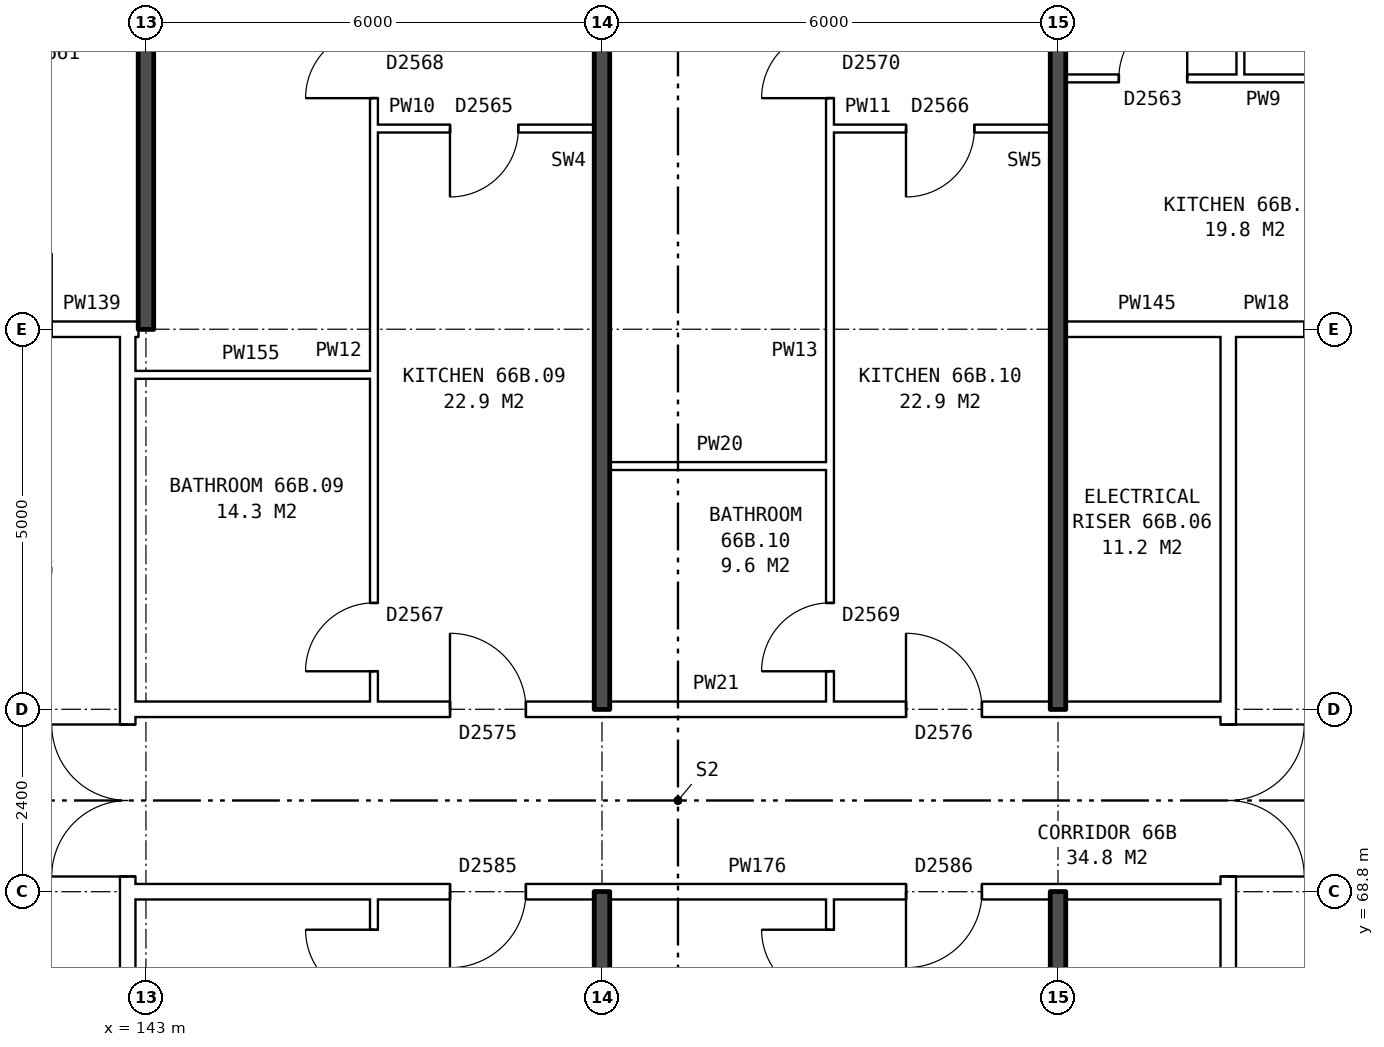
"""IFC4 building model, lengths in metres.
Left out: names, types, materials, properties, quantities, classifications, styles, units other than length and angle.
Written with IfcOpenShell. Run it as: python <this file> out.ifc"""

import sys

from ifc_helpers import new_model, si_unit, direction, frame, frame_2d, origin, place, context, subcontext, project, spatial, rectangle, extrude, element, fill, save


model = new_model("IFC4")
c1 = context("Model", 3, precision=1e-05, world=origin(), true_north=direction((0.0, 1.0)))
c2 = subcontext(c1, "Body", "Model", "MODEL_VIEW")
j1 = project(units=[si_unit("LENGTHUNIT", "METRE"), si_unit("PLANEANGLEUNIT", "RADIAN")], contexts=[c1])
p1 = place(None, origin())
s1 = spatial("IfcSite", under=j1, at=p1, CompositionType="ELEMENT")
p2 = place(p1, origin())
s2 = spatial("IfcBuilding", under=s1, at=p2, CompositionType="ELEMENT")
p3 = place(p2, frame((0.0, 0.0, 233.8)))
s3 = spatial("IfcBuildingStorey", under=s2, at=p3, CompositionType="ELEMENT", Elevation=233.8)
p4 = place(p3, frame((142.76, 63.9, 0.0), z_axis=(0.0, 0.0, 1.0), x_axis=(0.0, 1.0, 0.0)))
e1 = element("IfcWall", 1, at=p4, inside=s3, PredefinedType="PARTITIONING", context=c2, shape_type="SweptSolid", body=[
    extrude(rectangle(XDim=12.2, YDim=0.2, at=frame_2d((6.1, 0.0))), origin(), (0.0, 0.0, 1.0), 2.85),
])
p5 = place(p4, frame((5.1, 0.0, 0.0)))
e2 = element("IfcOpeningElement", 2, at=p5, cuts=e1, PredefinedType="OPENING", context=c2, shape_type="SweptSolid", body=[
    extrude(rectangle(XDim=2.0, YDim=2.1, at=frame_2d((1.0, 1.05))), frame((0.0, 0.11, 0.0), z_axis=(0.0, -1.0, 0.0), x_axis=(1.0, 0.0, 0.0)), (0.0, 0.0, 1.0), 0.22),
])
p6 = place(p3, frame((157.24, 63.9, 0.0), z_axis=(0.0, 0.0, 1.0), x_axis=(0.0, 1.0, 0.0)))
e3 = element("IfcWall", 3, at=p6, inside=s3, PredefinedType="PARTITIONING", context=c2, shape_type="SweptSolid", body=[
    extrude(rectangle(XDim=12.2, YDim=0.2, at=frame_2d((6.1, 0.0))), origin(), (0.0, 0.0, 1.0), 2.85),
])
p7 = place(p6, frame((5.1, 0.0, 0.0)))
e4 = element("IfcOpeningElement", 4, at=p7, cuts=e3, PredefinedType="OPENING", context=c2, shape_type="SweptSolid", body=[
    extrude(rectangle(XDim=2.0, YDim=2.1, at=frame_2d((1.0, 1.05))), frame((0.0, 0.11, 0.0), z_axis=(0.0, -1.0, 0.0), x_axis=(1.0, 0.0, 0.0)), (0.0, 0.0, 1.0), 0.22),
])
p8 = place(p3, frame((142.76, 68.8, 0.0), z_axis=(0.0, 0.0, 1.0), x_axis=(1.0, 0.0, 0.0)))
e5 = element("IfcWall", 5, at=p8, inside=s3, PredefinedType="PARTITIONING", context=c2, shape_type="SweptSolid", body=[
    extrude(rectangle(XDim=14.48, YDim=0.2, at=frame_2d((7.24, 0.0))), origin(), (0.0, 0.0, 1.0), 2.85),
])
p9 = place(p8, frame((4.24, 0.0, 0.0)))
e6 = element("IfcOpeningElement", 6, at=p9, cuts=e5, PredefinedType="OPENING", context=c2, shape_type="SweptSolid", body=[
    extrude(rectangle(XDim=1.0, YDim=2.1, at=frame_2d((0.5, 1.05))), frame((0.0, 0.11, 0.0), z_axis=(0.0, -1.0, 0.0), x_axis=(1.0, 0.0, 0.0)), (0.0, 0.0, 1.0), 0.22),
])
p10 = place(p8, frame((10.24, 0.0, 0.0)))
e7 = element("IfcOpeningElement", 7, at=p10, cuts=e5, PredefinedType="OPENING", context=c2, shape_type="SweptSolid", body=[
    extrude(rectangle(XDim=1.0, YDim=2.1, at=frame_2d((0.5, 1.05))), frame((0.0, 0.11, 0.0), z_axis=(0.0, -1.0, 0.0), x_axis=(1.0, 0.0, 0.0)), (0.0, 0.0, 1.0), 0.22),
])
p11 = place(p3, frame((142.76, 71.2, 0.0), z_axis=(0.0, 0.0, 1.0), x_axis=(1.0, 0.0, 0.0)))
e8 = element("IfcWall", 8, at=p11, inside=s3, PredefinedType="PARTITIONING", context=c2, shape_type="SweptSolid", body=[
    extrude(rectangle(XDim=14.48, YDim=0.2, at=frame_2d((7.24, 0.0))), origin(), (0.0, 0.0, 1.0), 2.85),
])
p12 = place(p11, frame((4.24, 0.0, 0.0)))
e9 = element("IfcOpeningElement", 9, at=p12, cuts=e8, PredefinedType="OPENING", context=c2, shape_type="SweptSolid", body=[
    extrude(rectangle(XDim=1.0, YDim=2.1, at=frame_2d((0.5, 1.05))), frame((0.0, 0.11, 0.0), z_axis=(0.0, -1.0, 0.0), x_axis=(1.0, 0.0, 0.0)), (0.0, 0.0, 1.0), 0.22),
])
p13 = place(p11, frame((10.24, 0.0, 0.0)))
e10 = element("IfcOpeningElement", 10, at=p13, cuts=e8, PredefinedType="OPENING", context=c2, shape_type="SweptSolid", body=[
    extrude(rectangle(XDim=1.0, YDim=2.1, at=frame_2d((0.5, 1.05))), frame((0.0, 0.11, 0.0), z_axis=(0.0, -1.0, 0.0), x_axis=(1.0, 0.0, 0.0)), (0.0, 0.0, 1.0), 0.22),
])
p14 = place(p3, frame((149.1, 74.4, 0.0), z_axis=(0.0, 0.0, 1.0), x_axis=(1.0, 0.0, 0.0)))
e11 = element("IfcWall", 11, at=p14, inside=s3, PredefinedType="PARTITIONING", context=c2, shape_type="SweptSolid", body=[
    extrude(rectangle(XDim=2.9, YDim=0.1, at=frame_2d((1.45, 0.0))), origin(), (0.0, 0.0, 1.0), 2.85),
])
p15 = place(p3, frame((142.76, 75.6, 0.0), z_axis=(0.0, 0.0, 1.0), x_axis=(1.0, 0.0, 0.0)))
e12 = element("IfcWall", 12, at=p15, inside=s3, PredefinedType="PARTITIONING", context=c2, shape_type="SweptSolid", body=[
    extrude(rectangle(XDim=3.24, YDim=0.1, at=frame_2d((1.62, 0.0))), origin(), (0.0, 0.0, 1.0), 2.85),
])
p16 = place(p3, frame((139.76, 76.2, 0.0), z_axis=(0.0, 0.0, 1.0), x_axis=(1.0, 0.0, 0.0)))
e13 = element("IfcWall", 13, at=p16, inside=s3, PredefinedType="PARTITIONING", context=c2, shape_type="SweptSolid", body=[
    extrude(rectangle(XDim=3.0, YDim=0.2, at=frame_2d((1.5, 0.0))), origin(), (0.0, 0.0, 1.0), 2.85),
])
p17 = place(p16, frame((1.0, 0.0, 0.0)))
e14 = element("IfcOpeningElement", 14, at=p17, cuts=e13, PredefinedType="OPENING", context=c2, shape_type="SweptSolid", body=[
    extrude(rectangle(XDim=1.0, YDim=2.1, at=frame_2d((0.5, 1.05))), frame((0.0, 0.11, 0.0), z_axis=(0.0, -1.0, 0.0), x_axis=(1.0, 0.0, 0.0)), (0.0, 0.0, 1.0), 0.22),
])
p18 = place(p3, frame((142.76, 76.2, 0.0), z_axis=(0.0, 0.0, 1.0), x_axis=(1.0, 0.0, 0.0)))
e15 = element("IfcWall", 15, at=p18, inside=s3, PredefinedType="PARTITIONING", context=c2, shape_type="SweptSolid", body=[
    extrude(rectangle(XDim=0.14, YDim=0.2, at=frame_2d((0.07, 0.0))), origin(), (0.0, 0.0, 1.0), 2.85),
])
p19 = place(p3, frame((155.1, 76.2, 0.0), z_axis=(0.0, 0.0, 1.0), x_axis=(1.0, 0.0, 0.0)))
e16 = element("IfcWall", 16, at=p19, inside=s3, PredefinedType="PARTITIONING", context=c2, shape_type="SweptSolid", body=[
    extrude(rectangle(XDim=2.14, YDim=0.2, at=frame_2d((1.07, 0.0))), origin(), (0.0, 0.0, 1.0), 2.85),
])
p20 = place(p3, frame((157.24, 76.2, 0.0), z_axis=(0.0, 0.0, 1.0), x_axis=(1.0, 0.0, 0.0)))
e17 = element("IfcWall", 17, at=p20, inside=s3, PredefinedType="PARTITIONING", context=c2, shape_type="SweptSolid", body=[
    extrude(rectangle(XDim=3.0, YDim=0.2, at=frame_2d((1.5, 0.0))), origin(), (0.0, 0.0, 1.0), 2.85),
])
p21 = place(p20, frame((1.0, 0.0, 0.0)))
e18 = element("IfcOpeningElement", 18, at=p21, cuts=e17, PredefinedType="OPENING", context=c2, shape_type="SweptSolid", body=[
    extrude(rectangle(XDim=1.0, YDim=2.1, at=frame_2d((0.5, 1.05))), frame((0.0, 0.11, 0.0), z_axis=(0.0, -1.0, 0.0), x_axis=(1.0, 0.0, 0.0)), (0.0, 0.0, 1.0), 0.22),
])
p22 = place(p3, frame((146.0, 78.84, 0.0), z_axis=(0.0, 0.0, 1.0), x_axis=(1.0, 0.0, 0.0)))
e19 = element("IfcWall", 19, at=p22, inside=s3, PredefinedType="PARTITIONING", context=c2, shape_type="SweptSolid", body=[
    extrude(rectangle(XDim=2.9, YDim=0.1, at=frame_2d((1.45, 0.0))), origin(), (0.0, 0.0, 1.0), 2.85),
])
p23 = place(p22, frame((1.0, 0.0, 0.0)))
e20 = element("IfcOpeningElement", 20, at=p23, cuts=e19, PredefinedType="OPENING", context=c2, shape_type="SweptSolid", body=[
    extrude(rectangle(XDim=0.9, YDim=2.1, at=frame_2d((0.45, 1.05))), frame((0.0, 0.06, 0.0), z_axis=(0.0, -1.0, 0.0), x_axis=(1.0, 0.0, 0.0)), (0.0, 0.0, 1.0), 0.12),
])
p24 = place(p3, frame((152.0, 78.84, 0.0), z_axis=(0.0, 0.0, 1.0), x_axis=(1.0, 0.0, 0.0)))
e21 = element("IfcWall", 21, at=p24, inside=s3, PredefinedType="PARTITIONING", context=c2, shape_type="SweptSolid", body=[
    extrude(rectangle(XDim=2.9, YDim=0.1, at=frame_2d((1.45, 0.0))), origin(), (0.0, 0.0, 1.0), 2.85),
])
p25 = place(p24, frame((1.0, 0.0, 0.0)))
e22 = element("IfcOpeningElement", 22, at=p25, cuts=e21, PredefinedType="OPENING", context=c2, shape_type="SweptSolid", body=[
    extrude(rectangle(XDim=0.9, YDim=2.1, at=frame_2d((0.45, 1.05))), frame((0.0, 0.06, 0.0), z_axis=(0.0, -1.0, 0.0), x_axis=(1.0, 0.0, 0.0)), (0.0, 0.0, 1.0), 0.12),
])
p26 = place(p3, frame((155.1, 79.5, 0.0), z_axis=(0.0, 0.0, 1.0), x_axis=(1.0, 0.0, 0.0)))
e23 = element("IfcWall", 23, at=p26, inside=s3, PredefinedType="PARTITIONING", context=c2, shape_type="SweptSolid", body=[
    extrude(rectangle(XDim=5.8, YDim=0.1, at=frame_2d((2.9, 0.0))), origin(), (0.0, 0.0, 1.0), 2.85),
])
p27 = place(p26, frame((3.6, 0.0, 0.0)))
e24 = element("IfcOpeningElement", 24, at=p27, cuts=e23, PredefinedType="OPENING", context=c2, shape_type="SweptSolid", body=[
    extrude(rectangle(XDim=0.9, YDim=2.1, at=frame_2d((0.45, 1.05))), frame((0.0, 0.06, 0.0), z_axis=(0.0, -1.0, 0.0), x_axis=(1.0, 0.0, 0.0)), (0.0, 0.0, 1.0), 0.12),
])
p28 = place(p26, frame((0.7, 0.0, 0.0)))
e25 = element("IfcOpeningElement", 25, at=p28, cuts=e23, PredefinedType="OPENING", context=c2, shape_type="SweptSolid", body=[
    extrude(rectangle(XDim=0.9, YDim=2.1, at=frame_2d((0.45, 1.05))), frame((0.0, 0.06, 0.0), z_axis=(0.0, -1.0, 0.0), x_axis=(1.0, 0.0, 0.0)), (0.0, 0.0, 1.0), 0.12),
])
p29 = place(p3, frame((143.0, 76.2, 0.0), z_axis=(0.0, 0.0, 1.0), x_axis=(0.0, 1.0, 0.0)))
e26 = element("IfcWall", 26, at=p29, inside=s3, PredefinedType="SOLIDWALL", context=c2, shape_type="SweptSolid", body=[
    extrude(rectangle(XDim=9.44, YDim=0.2, at=frame_2d((4.72, 0.0))), origin(), (0.0, 0.0, 1.0), 2.85),
])
p30 = place(p3, frame((146.0, 54.36, 0.0), z_axis=(0.0, 0.0, 1.0), x_axis=(0.0, 1.0, 0.0)))
e27 = element("IfcWall", 27, at=p30, inside=s3, PredefinedType="PARTITIONING", context=c2, shape_type="SweptSolid", body=[
    extrude(rectangle(XDim=14.34, YDim=0.1, at=frame_2d((7.17, 0.0))), origin(), (0.0, 0.0, 1.0), 2.85),
])
p31 = place(p30, frame((7.7, 0.0, 0.0)))
e28 = element("IfcOpeningElement", 28, at=p31, cuts=e27, PredefinedType="OPENING", context=c2, shape_type="SweptSolid", body=[
    extrude(rectangle(XDim=0.9, YDim=2.1, at=frame_2d((0.45, 1.05))), frame((0.0, 0.06, 0.0), z_axis=(0.0, -1.0, 0.0), x_axis=(1.0, 0.0, 0.0)), (0.0, 0.0, 1.0), 0.12),
])
p32 = place(p30, frame((13.04, 0.0, 0.0)))
e29 = element("IfcOpeningElement", 29, at=p32, cuts=e27, PredefinedType="OPENING", context=c2, shape_type="SweptSolid", body=[
    extrude(rectangle(XDim=0.9, YDim=2.1, at=frame_2d((0.45, 1.05))), frame((0.0, 0.06, 0.0), z_axis=(0.0, -1.0, 0.0), x_axis=(1.0, 0.0, 0.0)), (0.0, 0.0, 1.0), 0.12),
])
p33 = place(p3, frame((146.0, 71.3, 0.0), z_axis=(0.0, 0.0, 1.0), x_axis=(0.0, 1.0, 0.0)))
e30 = element("IfcWall", 30, at=p33, inside=s3, PredefinedType="PARTITIONING", context=c2, shape_type="SweptSolid", body=[
    extrude(rectangle(XDim=14.34, YDim=0.1, at=frame_2d((7.17, 0.0))), origin(), (0.0, 0.0, 1.0), 2.85),
])
p34 = place(p33, frame((7.94, 0.0, 0.0)))
e31 = element("IfcOpeningElement", 31, at=p34, cuts=e30, PredefinedType="OPENING", context=c2, shape_type="SweptSolid", body=[
    extrude(rectangle(XDim=0.9, YDim=2.1, at=frame_2d((0.45, 1.05))), frame((0.0, 0.06, 0.0), z_axis=(0.0, -1.0, 0.0), x_axis=(1.0, 0.0, 0.0)), (0.0, 0.0, 1.0), 0.12),
])
p35 = place(p33, frame((0.4, 0.0, 0.0)))
e32 = element("IfcOpeningElement", 32, at=p35, cuts=e30, PredefinedType="OPENING", context=c2, shape_type="SweptSolid", body=[
    extrude(rectangle(XDim=0.9, YDim=2.1, at=frame_2d((0.45, 1.05))), frame((0.0, 0.06, 0.0), z_axis=(0.0, -1.0, 0.0), x_axis=(1.0, 0.0, 0.0)), (0.0, 0.0, 1.0), 0.12),
])
for number, where, z_axis, x_axis in (
    (33, (149.0, 54.36, 0.0), (0.0, 0.0, 1.0), (0.0, 1.0, 0.0)),
    (34, (149.0, 71.2, 0.0), (0.0, 0.0, 1.0), (0.0, 1.0, 0.0)),
):
    element("IfcWall", number, at=place(p3, frame(where, z_axis=z_axis, x_axis=x_axis)), inside=s3, PredefinedType="SOLIDWALL", context=c2, shape_type="SweptSolid", body=[
        extrude(rectangle(XDim=14.44, YDim=0.2, at=frame_2d((7.22, 0.0))), origin(), (0.0, 0.0, 1.0), 2.85),
    ])
p36 = place(p3, frame((152.0, 54.36, 0.0), z_axis=(0.0, 0.0, 1.0), x_axis=(0.0, 1.0, 0.0)))
e35 = element("IfcWall", 35, at=p36, inside=s3, PredefinedType="PARTITIONING", context=c2, shape_type="SweptSolid", body=[
    extrude(rectangle(XDim=14.34, YDim=0.1, at=frame_2d((7.17, 0.0))), origin(), (0.0, 0.0, 1.0), 2.85),
])
p37 = place(p36, frame((4.2, 0.0, 0.0)))
e36 = element("IfcOpeningElement", 36, at=p37, cuts=e35, PredefinedType="OPENING", context=c2, shape_type="SweptSolid", body=[
    extrude(rectangle(XDim=0.9, YDim=2.1, at=frame_2d((0.45, 1.05))), frame((0.0, 0.06, 0.0), z_axis=(0.0, -1.0, 0.0), x_axis=(1.0, 0.0, 0.0)), (0.0, 0.0, 1.0), 0.12),
])
p38 = place(p36, frame((13.04, 0.0, 0.0)))
e37 = element("IfcOpeningElement", 37, at=p38, cuts=e35, PredefinedType="OPENING", context=c2, shape_type="SweptSolid", body=[
    extrude(rectangle(XDim=0.9, YDim=2.1, at=frame_2d((0.45, 1.05))), frame((0.0, 0.06, 0.0), z_axis=(0.0, -1.0, 0.0), x_axis=(1.0, 0.0, 0.0)), (0.0, 0.0, 1.0), 0.12),
])
p39 = place(p3, frame((152.0, 71.3, 0.0), z_axis=(0.0, 0.0, 1.0), x_axis=(0.0, 1.0, 0.0)))
e38 = element("IfcWall", 38, at=p39, inside=s3, PredefinedType="PARTITIONING", context=c2, shape_type="SweptSolid", body=[
    extrude(rectangle(XDim=14.34, YDim=0.1, at=frame_2d((7.17, 0.0))), origin(), (0.0, 0.0, 1.0), 2.85),
])
p40 = place(p39, frame((7.94, 0.0, 0.0)))
e39 = element("IfcOpeningElement", 39, at=p40, cuts=e38, PredefinedType="OPENING", context=c2, shape_type="SweptSolid", body=[
    extrude(rectangle(XDim=0.9, YDim=2.1, at=frame_2d((0.45, 1.05))), frame((0.0, 0.06, 0.0), z_axis=(0.0, -1.0, 0.0), x_axis=(1.0, 0.0, 0.0)), (0.0, 0.0, 1.0), 0.12),
])
p41 = place(p39, frame((0.4, 0.0, 0.0)))
e40 = element("IfcOpeningElement", 40, at=p41, cuts=e38, PredefinedType="OPENING", context=c2, shape_type="SweptSolid", body=[
    extrude(rectangle(XDim=0.9, YDim=2.1, at=frame_2d((0.45, 1.05))), frame((0.0, 0.06, 0.0), z_axis=(0.0, -1.0, 0.0), x_axis=(1.0, 0.0, 0.0)), (0.0, 0.0, 1.0), 0.12),
])
for number, where, z_axis, x_axis in (
    (41, (155.0, 54.36, 0.0), (0.0, 0.0, 1.0), (0.0, 1.0, 0.0)),
    (42, (155.0, 71.2, 0.0), (0.0, 0.0, 1.0), (0.0, 1.0, 0.0)),
):
    element("IfcWall", number, at=place(p3, frame(where, z_axis=z_axis, x_axis=x_axis)), inside=s3, PredefinedType="SOLIDWALL", context=c2, shape_type="SweptSolid", body=[
        extrude(rectangle(XDim=14.44, YDim=0.2, at=frame_2d((7.22, 0.0))), origin(), (0.0, 0.0, 1.0), 2.85),
    ])
p42 = place(p3, frame((157.4, 79.55, 0.0), z_axis=(0.0, 0.0, 1.0), x_axis=(0.0, 1.0, 0.0)))
e43 = element("IfcWall", 43, at=p42, inside=s3, PredefinedType="PARTITIONING", context=c2, shape_type="SweptSolid", body=[
    extrude(rectangle(XDim=2.7, YDim=0.1, at=frame_2d((1.35, 0.0))), origin(), (0.0, 0.0, 1.0), 2.85),
])
p43 = place(p5, origin())
e44 = element("IfcDoor", 44, at=p43, inside=s3, OperationType="DOUBLE_DOOR_SINGLE_SWING", PredefinedType="DOOR", context=c2, shape_type="SweptSolid", body=[
    extrude(rectangle(XDim=2.0, YDim=2.1, at=frame_2d((1.0, 1.05))), frame((0.0, 0.025, 0.0), z_axis=(0.0, -1.0, 0.0), x_axis=(1.0, 0.0, 0.0)), (0.0, 0.0, 1.0), 0.05),
])
fill(e2, e44)
p44 = place(p7, frame((2.0, 0.0, 0.0), z_axis=(0.0, 0.0, 1.0), x_axis=(-1.0, 0.0, 0.0)))
e45 = element("IfcDoor", 45, at=p44, inside=s3, OperationType="DOUBLE_DOOR_SINGLE_SWING", PredefinedType="DOOR", context=c2, shape_type="SweptSolid", body=[
    extrude(rectangle(XDim=2.0, YDim=2.1, at=frame_2d((1.0, 1.05))), frame((0.0, 0.025, 0.0), z_axis=(0.0, -1.0, 0.0), x_axis=(1.0, 0.0, 0.0)), (0.0, 0.0, 1.0), 0.05),
])
fill(e4, e45)
p45 = place(p28, origin())
e46 = element("IfcDoor", 46, at=p45, inside=s3, OperationType="SINGLE_SWING_RIGHT", PredefinedType="DOOR", context=c2, shape_type="SweptSolid", body=[
    extrude(rectangle(XDim=0.9, YDim=2.1, at=frame_2d((0.45, 1.05))), frame((0.0, 0.025, 0.0), z_axis=(0.0, -1.0, 0.0), x_axis=(1.0, 0.0, 0.0)), (0.0, 0.0, 1.0), 0.05),
])
fill(e25, e46)
p46 = place(p9, frame((1.0, 0.0, 0.0), z_axis=(0.0, 0.0, 1.0), x_axis=(-1.0, 0.0, 0.0)))
e47 = element("IfcDoor", 47, at=p46, inside=s3, OperationType="SINGLE_SWING_RIGHT", PredefinedType="DOOR", context=c2, shape_type="SweptSolid", body=[
    extrude(rectangle(XDim=1.0, YDim=2.1, at=frame_2d((0.5, 1.05))), frame((0.0, 0.025, 0.0), z_axis=(0.0, -1.0, 0.0), x_axis=(1.0, 0.0, 0.0)), (0.0, 0.0, 1.0), 0.05),
])
fill(e6, e47)
p47 = place(p32, origin())
e48 = element("IfcDoor", 48, at=p47, inside=s3, OperationType="SINGLE_SWING_RIGHT", PredefinedType="DOOR", context=c2, shape_type="SweptSolid", body=[
    extrude(rectangle(XDim=0.9, YDim=2.1, at=frame_2d((0.45, 1.05))), frame((0.0, 0.025, 0.0), z_axis=(0.0, -1.0, 0.0), x_axis=(1.0, 0.0, 0.0)), (0.0, 0.0, 1.0), 0.05),
])
fill(e29, e48)
p48 = place(p10, frame((1.0, 0.0, 0.0), z_axis=(0.0, 0.0, 1.0), x_axis=(-1.0, 0.0, 0.0)))
e49 = element("IfcDoor", 49, at=p48, inside=s3, OperationType="SINGLE_SWING_RIGHT", PredefinedType="DOOR", context=c2, shape_type="SweptSolid", body=[
    extrude(rectangle(XDim=1.0, YDim=2.1, at=frame_2d((0.5, 1.05))), frame((0.0, 0.025, 0.0), z_axis=(0.0, -1.0, 0.0), x_axis=(1.0, 0.0, 0.0)), (0.0, 0.0, 1.0), 0.05),
])
fill(e7, e49)
p49 = place(p38, origin())
e50 = element("IfcDoor", 50, at=p49, inside=s3, OperationType="SINGLE_SWING_RIGHT", PredefinedType="DOOR", context=c2, shape_type="SweptSolid", body=[
    extrude(rectangle(XDim=0.9, YDim=2.1, at=frame_2d((0.45, 1.05))), frame((0.0, 0.025, 0.0), z_axis=(0.0, -1.0, 0.0), x_axis=(1.0, 0.0, 0.0)), (0.0, 0.0, 1.0), 0.05),
])
fill(e37, e50)
p50 = place(p34, origin())
e51 = element("IfcDoor", 51, at=p50, inside=s3, OperationType="SINGLE_SWING_LEFT", PredefinedType="DOOR", context=c2, shape_type="SweptSolid", body=[
    extrude(rectangle(XDim=0.9, YDim=2.1, at=frame_2d((0.45, 1.05))), frame((0.0, 0.025, 0.0), z_axis=(0.0, -1.0, 0.0), x_axis=(1.0, 0.0, 0.0)), (0.0, 0.0, 1.0), 0.05),
])
fill(e31, e51)
p51 = place(p12, origin())
e52 = element("IfcDoor", 52, at=p51, inside=s3, OperationType="SINGLE_SWING_LEFT", PredefinedType="DOOR", context=c2, shape_type="SweptSolid", body=[
    extrude(rectangle(XDim=1.0, YDim=2.1, at=frame_2d((0.5, 1.05))), frame((0.0, 0.025, 0.0), z_axis=(0.0, -1.0, 0.0), x_axis=(1.0, 0.0, 0.0)), (0.0, 0.0, 1.0), 0.05),
])
fill(e9, e52)
p52 = place(p23, frame((0.9, 0.0, 0.0), z_axis=(0.0, 0.0, 1.0), x_axis=(-1.0, 0.0, 0.0)))
e53 = element("IfcDoor", 53, at=p52, inside=s3, OperationType="SINGLE_SWING_RIGHT", PredefinedType="DOOR", context=c2, shape_type="SweptSolid", body=[
    extrude(rectangle(XDim=0.9, YDim=2.1, at=frame_2d((0.45, 1.05))), frame((0.0, 0.025, 0.0), z_axis=(0.0, -1.0, 0.0), x_axis=(1.0, 0.0, 0.0)), (0.0, 0.0, 1.0), 0.05),
])
fill(e20, e53)
p53 = place(p35, origin())
e54 = element("IfcDoor", 54, at=p53, inside=s3, OperationType="SINGLE_SWING_LEFT", PredefinedType="DOOR", context=c2, shape_type="SweptSolid", body=[
    extrude(rectangle(XDim=0.9, YDim=2.1, at=frame_2d((0.45, 1.05))), frame((0.0, 0.025, 0.0), z_axis=(0.0, -1.0, 0.0), x_axis=(1.0, 0.0, 0.0)), (0.0, 0.0, 1.0), 0.05),
])
fill(e32, e54)
p54 = place(p40, origin())
e55 = element("IfcDoor", 55, at=p54, inside=s3, OperationType="SINGLE_SWING_LEFT", PredefinedType="DOOR", context=c2, shape_type="SweptSolid", body=[
    extrude(rectangle(XDim=0.9, YDim=2.1, at=frame_2d((0.45, 1.05))), frame((0.0, 0.025, 0.0), z_axis=(0.0, -1.0, 0.0), x_axis=(1.0, 0.0, 0.0)), (0.0, 0.0, 1.0), 0.05),
])
fill(e39, e55)
p55 = place(p13, origin())
e56 = element("IfcDoor", 56, at=p55, inside=s3, OperationType="SINGLE_SWING_LEFT", PredefinedType="DOOR", context=c2, shape_type="SweptSolid", body=[
    extrude(rectangle(XDim=1.0, YDim=2.1, at=frame_2d((0.5, 1.05))), frame((0.0, 0.025, 0.0), z_axis=(0.0, -1.0, 0.0), x_axis=(1.0, 0.0, 0.0)), (0.0, 0.0, 1.0), 0.05),
])
fill(e10, e56)
p56 = place(p25, frame((0.9, 0.0, 0.0), z_axis=(0.0, 0.0, 1.0), x_axis=(-1.0, 0.0, 0.0)))
e57 = element("IfcDoor", 57, at=p56, inside=s3, OperationType="SINGLE_SWING_RIGHT", PredefinedType="DOOR", context=c2, shape_type="SweptSolid", body=[
    extrude(rectangle(XDim=0.9, YDim=2.1, at=frame_2d((0.45, 1.05))), frame((0.0, 0.025, 0.0), z_axis=(0.0, -1.0, 0.0), x_axis=(1.0, 0.0, 0.0)), (0.0, 0.0, 1.0), 0.05),
])
fill(e22, e57)
p57 = place(p41, origin())
e58 = element("IfcDoor", 58, at=p57, inside=s3, OperationType="SINGLE_SWING_LEFT", PredefinedType="DOOR", context=c2, shape_type="SweptSolid", body=[
    extrude(rectangle(XDim=0.9, YDim=2.1, at=frame_2d((0.45, 1.05))), frame((0.0, 0.025, 0.0), z_axis=(0.0, -1.0, 0.0), x_axis=(1.0, 0.0, 0.0)), (0.0, 0.0, 1.0), 0.05),
])
fill(e40, e58)
save(model, sys.argv[1])
